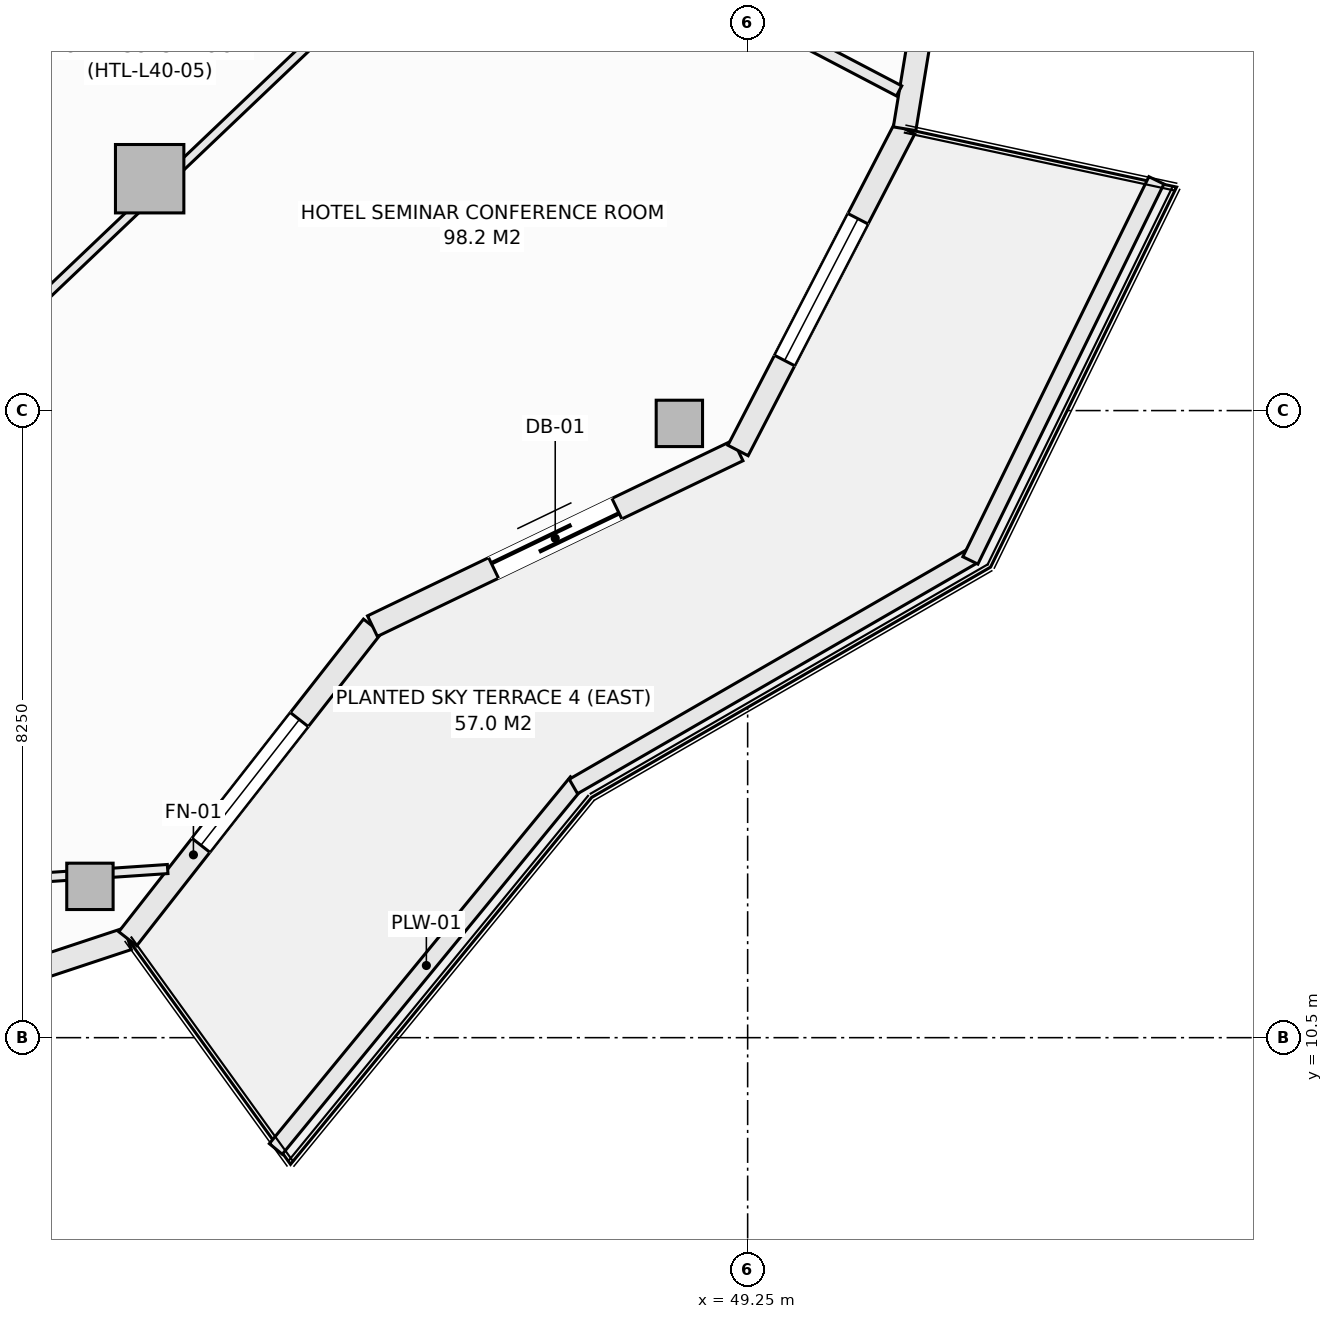
"""IFC4 building model, lengths in metres.
Left out: names, types, materials, properties, quantities, classifications, styles, units other than length and angle.
Written with IfcOpenShell. Run it as: python <this file> out.ifc"""

import sys

from ifc_helpers import new_model, si_unit, direction, frame, frame_2d, origin, origin_2d, place, context, subcontext, project, spatial, rectangle, hollow_rectangle, extrude, element, fill, save


model = new_model("IFC4")
c1 = context("Model", 3, precision=1e-05, world=origin(), true_north=direction((0.0, 1.0)))
c2 = subcontext(c1, "Body", "Model", "MODEL_VIEW")
j1 = project(units=[si_unit("LENGTHUNIT", "METRE"), si_unit("PLANEANGLEUNIT", "RADIAN")], contexts=[c1])
p1 = place(None, origin())
s1 = spatial("IfcSite", under=j1, at=p1, CompositionType="ELEMENT")
p2 = place(p1, origin())
s2 = spatial("IfcBuilding", under=s1, at=p2, CompositionType="ELEMENT")
p3 = place(p2, frame((0.0, 0.0, 156.3)))
s3 = spatial("IfcBuildingStorey", under=s2, at=p3, CompositionType="ELEMENT", Elevation=156.3)
for number, where, z_axis, x_axis in (
    (1, (40.596, 12.49, -0.27), (0.0, 0.0, 1.0), (1.0, 0.0, 0.0)),
    (2, (48.352, 18.581, -0.27), (0.0, 0.0, 1.0), (1.0, 0.0, 0.0)),
):
    element("IfcColumn", number, at=place(p3, frame(where, z_axis=z_axis, x_axis=x_axis)), inside=s3, PredefinedType="COLUMN", context=c2, shape_type="SweptSolid", body=[
        extrude(hollow_rectangle(XDim=0.61, YDim=0.61, WallThickness=0.025, at=origin_2d()), origin(), (0.0, 0.0, 1.0), 3.4),
    ])
p4 = place(p3, frame((41.382, 21.801, -0.27), z_axis=(0.0, 0.0, 1.0), x_axis=(1.0, 0.0, 0.0)))
e3 = element("IfcColumn", 3, at=p4, inside=s3, PredefinedType="COLUMN", context=c2, shape_type="SweptSolid", body=[
    extrude(rectangle(XDim=0.9, YDim=0.9, at=origin_2d()), origin(), (0.0, 0.0, 1.0), 3.4),
])
p5 = place(p3, frame((35.803, 10.048, 0.0), z_axis=(0.0, 0.0, 1.0), x_axis=(0.949246811547, 0.314532177636, 0.0)))
e4 = element("IfcWall", 4, at=p5, inside=s3, PredefinedType="SOLIDWALL", context=c2, shape_type="SweptSolid", body=[
    extrude(rectangle(XDim=5.574, YDim=0.3, at=frame_2d((2.787, 0.0))), origin(), (0.0, 0.0, 1.0), 2.653),
])
p6 = place(p5, frame((1.737, 0.0, 0.74)))
e5 = element("IfcOpeningElement", 5, at=p6, cuts=e4, PredefinedType="OPENING", context=c2, shape_type="SweptSolid", body=[
    extrude(rectangle(XDim=2.1, YDim=1.7, at=frame_2d((1.05, 0.85))), frame((0.0, 0.16, 0.0), z_axis=(0.0, -1.0, 0.0), x_axis=(1.0, 0.0, 0.0)), (0.0, 0.0, 1.0), 0.32),
])
p7 = place(p3, frame((41.094, 11.801, 0.0), z_axis=(0.0, 0.0, 1.0), x_axis=(0.616429245738, 0.787410302828, 0.0)))
e6 = element("IfcWall", 6, at=p7, inside=s3, PredefinedType="SOLIDWALL", context=c2, shape_type="SweptSolid", body=[
    extrude(rectangle(XDim=5.223, YDim=0.3, at=frame_2d((2.612, 0.0))), origin(), (0.0, 0.0, 1.0), 2.653),
])
p8 = place(p7, frame((1.562, 0.0, 0.74)))
e7 = element("IfcOpeningElement", 7, at=p8, cuts=e6, PredefinedType="OPENING", context=c2, shape_type="SweptSolid", body=[
    extrude(rectangle(XDim=2.1, YDim=1.7, at=frame_2d((1.05, 0.85))), frame((0.0, 0.16, 0.0), z_axis=(0.0, -1.0, 0.0), x_axis=(1.0, 0.0, 0.0)), (0.0, 0.0, 1.0), 0.32),
])
p9 = place(p3, frame((44.313, 15.914, 0.0), z_axis=(0.0, 0.0, 1.0), x_axis=(0.901353070301, 0.433085029363, 0.0)))
e8 = element("IfcWall", 8, at=p9, inside=s3, PredefinedType="SOLIDWALL", context=c2, shape_type="SweptSolid", body=[
    extrude(rectangle(XDim=5.336, YDim=0.3, at=frame_2d((2.668, 0.0))), origin(), (0.0, 0.0, 1.0), 2.653),
])
p10 = place(p9, frame((1.768, 0.0, 0.0)))
e9 = element("IfcOpeningElement", 9, at=p10, cuts=e8, PredefinedType="OPENING", context=c2, shape_type="SweptSolid", body=[
    extrude(rectangle(XDim=1.8, YDim=2.25, at=frame_2d((0.9, 1.125))), frame((0.0, 0.16, 0.0), z_axis=(0.0, -1.0, 0.0), x_axis=(1.0, 0.0, 0.0)), (0.0, 0.0, 1.0), 0.32),
])
p11 = place(p3, frame((49.123, 18.225, 0.0), z_axis=(0.0, 0.0, 1.0), x_axis=(0.459810251451, 0.888017191647, 0.0)))
e10 = element("IfcWall", 10, at=p11, inside=s3, PredefinedType="SOLIDWALL", context=c2, shape_type="SweptSolid", body=[
    extrude(rectangle(XDim=4.766, YDim=0.3, at=frame_2d((2.383, 0.0))), origin(), (0.0, 0.0, 1.0), 2.653),
])
p12 = place(p11, frame((1.333, 0.0, 0.74)))
e11 = element("IfcOpeningElement", 11, at=p12, cuts=e10, PredefinedType="OPENING", context=c2, shape_type="SweptSolid", body=[
    extrude(rectangle(XDim=2.1, YDim=1.7, at=frame_2d((1.05, 0.85))), frame((0.0, 0.16, 0.0), z_axis=(0.0, -1.0, 0.0), x_axis=(1.0, 0.0, 0.0)), (0.0, 0.0, 1.0), 0.32),
])
p13 = place(p3, frame((51.315, 22.458, 0.0), z_axis=(0.0, 0.0, 1.0), x_axis=(0.162394765401, 0.986725868806, 0.0)))
e12 = element("IfcWall", 12, at=p13, inside=s3, PredefinedType="SOLIDWALL", context=c2, shape_type="SweptSolid", body=[
    extrude(rectangle(XDim=4.603, YDim=0.3, at=frame_2d((2.302, 0.0))), origin(), (0.0, 0.0, 1.0), 2.653),
])
p14 = place(p13, frame((1.252, 0.0, 0.74)))
e13 = element("IfcOpeningElement", 13, at=p14, cuts=e12, PredefinedType="OPENING", context=c2, shape_type="SweptSolid", body=[
    extrude(rectangle(XDim=2.1, YDim=1.7, at=frame_2d((1.05, 0.85))), frame((0.0, 0.16, 0.0), z_axis=(0.0, -1.0, 0.0), x_axis=(1.0, 0.0, 0.0)), (0.0, 0.0, 1.0), 0.32),
])
p15 = place(p3, frame((43.042, 9.036, 0.0), z_axis=(0.0, 0.0, 1.0), x_axis=(0.634429234628, 0.77298094818, 0.0)))
e14 = element("IfcWall", 14, at=p15, inside=s3, PredefinedType="PARAPET", context=c2, shape_type="SweptSolid", body=[
    extrude(rectangle(XDim=6.245, YDim=0.22, at=frame_2d((3.123, 0.0))), origin(), (0.0, 0.0, 1.0), 0.52),
])
p16 = place(p3, frame((46.958, 13.805, 0.0), z_axis=(0.0, 0.0, 1.0), x_axis=(0.866058128659, 0.499943314571, 0.0)))
e15 = element("IfcWall", 15, at=p16, inside=s3, PredefinedType="PARAPET", context=c2, shape_type="SweptSolid", body=[
    extrude(rectangle(XDim=6.06, YDim=0.22, at=frame_2d((3.03, 0.0))), origin(), (0.0, 0.0, 1.0), 0.52),
])
p17 = place(p3, frame((52.18, 16.779, 0.0), z_axis=(0.0, 0.0, 1.0), x_axis=(0.439637174641, 0.898175458735, 0.0)))
e16 = element("IfcWall", 16, at=p17, inside=s3, PredefinedType="PARAPET", context=c2, shape_type="SweptSolid", body=[
    extrude(rectangle(XDim=5.567, YDim=0.22, at=frame_2d((2.784, 0.0))), origin(), (0.0, 0.0, 1.0), 0.52),
])
p18 = place(p3, frame((38.962, 29.386, 0.0), z_axis=(0.0, 0.0, 1.0), x_axis=(0.885905291329, -0.463866160434, 0.0)))
e17 = element("IfcWall", 17, at=p18, inside=s3, PredefinedType="PARTITIONING", context=c2, shape_type="SweptSolid", body=[
    extrude(rectangle(XDim=13.863, YDim=0.15, at=frame_2d((6.931, 0.0))), origin(), (0.0, 0.0, 1.0), 2.505),
])
p19 = place(p3, frame((39.021, 19.324, 0.0), z_axis=(0.0, 0.0, 1.0), x_axis=(0.724517158733, 0.689256763986, 0.0)))
e18 = element("IfcWall", 18, at=p19, inside=s3, PredefinedType="PARTITIONING", context=c2, shape_type="SweptSolid", body=[
    extrude(rectangle(XDim=9.306, YDim=0.12, at=frame_2d((4.653, 0.0))), origin(), (0.0, 0.0, 1.0), 2.505),
])
p20 = place(p3, frame((36.012, 12.34, 0.0), z_axis=(0.0, 0.0, 1.0), x_axis=(0.997733146572, 0.067294637466, 0.0)))
e19 = element("IfcWall", 19, at=p20, inside=s3, PredefinedType="PARTITIONING", context=c2, shape_type="SweptSolid", body=[
    extrude(rectangle(XDim=5.62, YDim=0.12, at=frame_2d((2.81, 0.0))), origin(), (0.0, 0.0, 1.0), 2.653),
])
p21 = place(p8, origin())
e20 = element("IfcWindow", 20, at=p21, inside=s3, PartitioningType="SINGLE_PANEL", PredefinedType="WINDOW", context=c2, shape_type="SweptSolid", body=[
    extrude(rectangle(XDim=2.1, YDim=1.7, at=frame_2d((1.05, 0.85))), frame((0.0, 0.03, 0.0), z_axis=(0.0, -1.0, 0.0), x_axis=(1.0, 0.0, 0.0)), (0.0, 0.0, 1.0), 0.06),
])
fill(e7, e20)
p22 = place(p10, frame((1.8, 0.0, 0.0), z_axis=(0.0, 0.0, 1.0), x_axis=(-1.0, 0.0, 0.0)))
e21 = element("IfcDoor", 21, at=p22, inside=s3, OperationType="SLIDING_TO_LEFT", PredefinedType="DOOR", context=c2, shape_type="SweptSolid", body=[
    extrude(rectangle(XDim=1.8, YDim=2.25, at=frame_2d((0.9, 1.125))), frame((0.0, 0.025, 0.0), z_axis=(0.0, -1.0, 0.0), x_axis=(1.0, 0.0, 0.0)), (0.0, 0.0, 1.0), 0.05),
])
fill(e9, e21)
p23 = place(p12, origin())
e22 = element("IfcWindow", 22, at=p23, inside=s3, PartitioningType="SINGLE_PANEL", PredefinedType="WINDOW", context=c2, shape_type="SweptSolid", body=[
    extrude(rectangle(XDim=2.1, YDim=1.7, at=frame_2d((1.05, 0.85))), frame((0.0, 0.03, 0.0), z_axis=(0.0, -1.0, 0.0), x_axis=(1.0, 0.0, 0.0)), (0.0, 0.0, 1.0), 0.06),
])
fill(e11, e22)
save(model, sys.argv[1])
